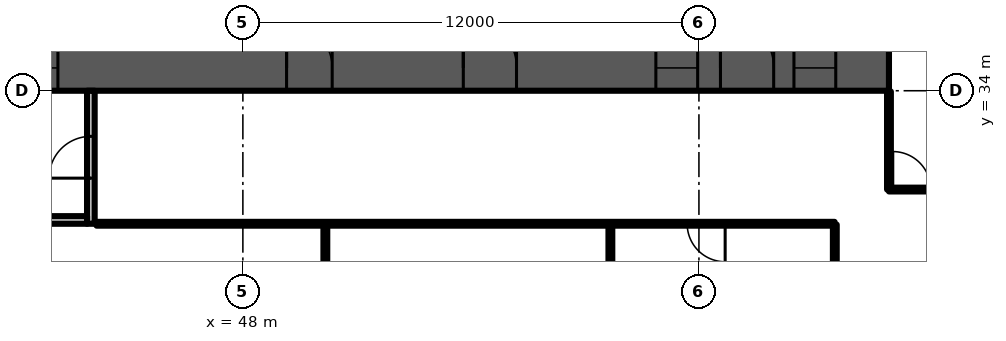
"""IFC4 building model, lengths in metres.
Left out: names, types, materials, properties, quantities, classifications, styles, units other than length and angle.
Written with IfcOpenShell. Run it as: python <this file> out.ifc"""

import sys

from ifc_helpers import new_model, si_unit, direction, frame, frame_2d, origin, place, context, subcontext, project, spatial, rectangle, extrude, element, fill, save


model = new_model("IFC4")
c1 = context("Model", 3, precision=1e-05, world=origin(), true_north=direction((0.0, 1.0)))
c2 = subcontext(c1, "Body", "Model", "MODEL_VIEW")
j1 = project(units=[si_unit("LENGTHUNIT", "METRE"), si_unit("PLANEANGLEUNIT", "RADIAN")], contexts=[c1])
p1 = place(None, origin())
s1 = spatial("IfcSite", under=j1, at=p1, CompositionType="ELEMENT")
p2 = place(p1, origin())
s2 = spatial("IfcBuilding", under=s1, at=p2, CompositionType="ELEMENT")
p3 = place(p2, frame((0.0, 0.0, 41.5)))
s3 = spatial("IfcBuildingStorey", under=s2, at=p3, CompositionType="ELEMENT", Elevation=41.5)
p4 = place(p3, frame((9.0, 34.6, 0.0), z_axis=(0.0, 0.0, 1.0), x_axis=(1.0, 0.0, 0.0)))
e1 = element("IfcWall", 1, at=p4, inside=s3, PredefinedType="SHEAR", context=c2, shape_type="SweptSolid", body=[
    extrude(rectangle(XDim=56.0, YDim=1.2, at=frame_2d((28.0, 0.0))), origin(), (0.0, 0.0, 1.0), 3.6),
])
p5 = place(p4, frame((3.3, 0.0, 0.0)))
e2 = element("IfcOpeningElement", 2, at=p5, cuts=e1, PredefinedType="OPENING", context=c2, shape_type="SweptSolid", body=[
    extrude(rectangle(XDim=1.0, YDim=2.1, at=frame_2d((0.5, 1.05))), frame((0.0, 0.61, 0.0), z_axis=(0.0, -1.0, 0.0), x_axis=(1.0, 0.0, 0.0)), (0.0, 0.0, 1.0), 1.22),
])
p6 = place(p4, frame((7.867, 0.0, 0.0)))
e3 = element("IfcOpeningElement", 3, at=p6, cuts=e1, PredefinedType="OPENING", context=c2, shape_type="SweptSolid", body=[
    extrude(rectangle(XDim=1.1, YDim=2.1, at=frame_2d((0.55, 1.05))), frame((0.0, 0.61, 0.0), z_axis=(0.0, -1.0, 0.0), x_axis=(1.0, 0.0, 0.0)), (0.0, 0.0, 1.0), 1.22),
])
p7 = place(p4, frame((12.033, 0.0, 0.0)))
e4 = element("IfcOpeningElement", 4, at=p7, cuts=e1, PredefinedType="OPENING", context=c2, shape_type="SweptSolid", body=[
    extrude(rectangle(XDim=1.1, YDim=2.1, at=frame_2d((0.55, 1.05))), frame((0.0, 0.61, 0.0), z_axis=(0.0, -1.0, 0.0), x_axis=(1.0, 0.0, 0.0)), (0.0, 0.0, 1.0), 1.22),
])
p8 = place(p4, frame((9.8, 0.0, 0.0)))
e5 = element("IfcOpeningElement", 5, at=p8, cuts=e1, PredefinedType="OPENING", context=c2, shape_type="SweptSolid", body=[
    extrude(rectangle(XDim=1.4, YDim=2.1, at=frame_2d((0.7, 1.05))), frame((0.0, 0.61, 0.0), z_axis=(0.0, -1.0, 0.0), x_axis=(1.0, 0.0, 0.0)), (0.0, 0.0, 1.0), 1.22),
])
p9 = place(p4, frame((14.65, 0.0, 0.0)))
e6 = element("IfcOpeningElement", 6, at=p9, cuts=e1, PredefinedType="OPENING", context=c2, shape_type="SweptSolid", body=[
    extrude(rectangle(XDim=1.2, YDim=2.1, at=frame_2d((0.6, 1.05))), frame((0.0, 0.61, 0.0), z_axis=(0.0, -1.0, 0.0), x_axis=(1.0, 0.0, 0.0)), (0.0, 0.0, 1.0), 1.22),
])
p10 = place(p4, frame((21.867, 0.0, 0.0)))
e7 = element("IfcOpeningElement", 7, at=p10, cuts=e1, PredefinedType="OPENING", context=c2, shape_type="SweptSolid", body=[
    extrude(rectangle(XDim=1.1, YDim=2.1, at=frame_2d((0.55, 1.05))), frame((0.0, 0.61, 0.0), z_axis=(0.0, -1.0, 0.0), x_axis=(1.0, 0.0, 0.0)), (0.0, 0.0, 1.0), 1.22),
])
p11 = place(p4, frame((26.033, 0.0, 0.0)))
e8 = element("IfcOpeningElement", 8, at=p11, cuts=e1, PredefinedType="OPENING", context=c2, shape_type="SweptSolid", body=[
    extrude(rectangle(XDim=1.1, YDim=2.1, at=frame_2d((0.55, 1.05))), frame((0.0, 0.61, 0.0), z_axis=(0.0, -1.0, 0.0), x_axis=(1.0, 0.0, 0.0)), (0.0, 0.0, 1.0), 1.22),
])
p12 = place(p4, frame((23.8, 0.0, 0.0)))
e9 = element("IfcOpeningElement", 9, at=p12, cuts=e1, PredefinedType="OPENING", context=c2, shape_type="SweptSolid", body=[
    extrude(rectangle(XDim=1.4, YDim=2.1, at=frame_2d((0.7, 1.05))), frame((0.0, 0.61, 0.0), z_axis=(0.0, -1.0, 0.0), x_axis=(1.0, 0.0, 0.0)), (0.0, 0.0, 1.0), 1.22),
])
p13 = place(p4, frame((28.867, 0.0, 0.0)))
e10 = element("IfcOpeningElement", 10, at=p13, cuts=e1, PredefinedType="OPENING", context=c2, shape_type="SweptSolid", body=[
    extrude(rectangle(XDim=1.1, YDim=2.1, at=frame_2d((0.55, 1.05))), frame((0.0, 0.61, 0.0), z_axis=(0.0, -1.0, 0.0), x_axis=(1.0, 0.0, 0.0)), (0.0, 0.0, 1.0), 1.22),
])
p14 = place(p4, frame((33.033, 0.0, 0.0)))
e11 = element("IfcOpeningElement", 11, at=p14, cuts=e1, PredefinedType="OPENING", context=c2, shape_type="SweptSolid", body=[
    extrude(rectangle(XDim=1.1, YDim=2.1, at=frame_2d((0.55, 1.05))), frame((0.0, 0.61, 0.0), z_axis=(0.0, -1.0, 0.0), x_axis=(1.0, 0.0, 0.0)), (0.0, 0.0, 1.0), 1.22),
])
p15 = place(p4, frame((40.15, 0.0, 0.0)))
e12 = element("IfcOpeningElement", 12, at=p15, cuts=e1, PredefinedType="OPENING", context=c2, shape_type="SweptSolid", body=[
    extrude(rectangle(XDim=1.2, YDim=2.1, at=frame_2d((0.6, 1.05))), frame((0.0, 0.61, 0.0), z_axis=(0.0, -1.0, 0.0), x_axis=(1.0, 0.0, 0.0)), (0.0, 0.0, 1.0), 1.22),
])
p16 = place(p4, frame((44.8, 0.0, 0.0)))
e13 = element("IfcOpeningElement", 13, at=p16, cuts=e1, PredefinedType="OPENING", context=c2, shape_type="SweptSolid", body=[
    extrude(rectangle(XDim=1.4, YDim=2.1, at=frame_2d((0.7, 1.05))), frame((0.0, 0.61, 0.0), z_axis=(0.0, -1.0, 0.0), x_axis=(1.0, 0.0, 0.0)), (0.0, 0.0, 1.0), 1.22),
])
p17 = place(p4, frame((49.867, 0.0, 0.0)))
e14 = element("IfcOpeningElement", 14, at=p17, cuts=e1, PredefinedType="OPENING", context=c2, shape_type="SweptSolid", body=[
    extrude(rectangle(XDim=1.1, YDim=2.1, at=frame_2d((0.55, 1.05))), frame((0.0, 0.61, 0.0), z_axis=(0.0, -1.0, 0.0), x_axis=(1.0, 0.0, 0.0)), (0.0, 0.0, 1.0), 1.22),
])
p18 = place(p4, frame((53.5, 0.0, 0.0)))
e15 = element("IfcOpeningElement", 15, at=p18, cuts=e1, PredefinedType="OPENING", context=c2, shape_type="SweptSolid", body=[
    extrude(rectangle(XDim=1.1, YDim=2.1, at=frame_2d((0.55, 1.05))), frame((0.0, 0.61, 0.0), z_axis=(0.0, -1.0, 0.0), x_axis=(1.0, 0.0, 0.0)), (0.0, 0.0, 1.0), 1.22),
])
p19 = place(p4, frame((51.567, 0.0, 0.0)))
e16 = element("IfcOpeningElement", 16, at=p19, cuts=e1, PredefinedType="OPENING", context=c2, shape_type="SweptSolid", body=[
    extrude(rectangle(XDim=1.4, YDim=2.1, at=frame_2d((0.7, 1.05))), frame((0.0, 0.61, 0.0), z_axis=(0.0, -1.0, 0.0), x_axis=(1.0, 0.0, 0.0)), (0.0, 0.0, 1.0), 1.22),
])
p20 = place(p3, frame((44.0, 30.5, 0.0), z_axis=(0.0, 0.0, 1.0), x_axis=(0.0, 1.0, 0.0)))
e17 = element("IfcWall", 17, at=p20, inside=s3, PredefinedType="PARTITIONING", context=c2, shape_type="SweptSolid", body=[
    extrude(rectangle(XDim=3.5, YDim=0.2, at=frame_2d((1.75, 0.0))), origin(), (0.0, 0.0, 1.0), 3.2),
])
p21 = place(p20, frame((1.2, 0.0, 0.0)))
e18 = element("IfcOpeningElement", 18, at=p21, cuts=e17, PredefinedType="OPENING", context=c2, shape_type="SweptSolid", body=[
    extrude(rectangle(XDim=1.1, YDim=2.1, at=frame_2d((0.55, 1.05))), frame((0.0, 0.11, 0.0), z_axis=(0.0, -1.0, 0.0), x_axis=(1.0, 0.0, 0.0)), (0.0, 0.0, 1.0), 0.22),
])
p22 = place(p3, frame((41.1, 30.6, 0.0), z_axis=(0.0, 0.0, 1.0), x_axis=(1.0, 0.0, 0.0)))
e19 = element("IfcWall", 19, at=p22, inside=s3, PredefinedType="PARTITIONING", context=c2, shape_type="SweptSolid", body=[
    extrude(rectangle(XDim=2.8, YDim=0.2, at=frame_2d((1.4, 0.0))), origin(), (0.0, 0.0, 1.0), 3.2),
])
for number, where, z_axis, x_axis in (
    (20, (50.17, 14.24, 0.0), (0.0, 0.0, 1.0), (0.0, 1.0, 0.0)),
    (21, (57.67, 14.24, 0.0), (0.0, 0.0, 1.0), (0.0, 1.0, 0.0)),
):
    element("IfcWall", number, at=place(p3, frame(where, z_axis=z_axis, x_axis=x_axis)), inside=s3, PredefinedType="PARTITIONING", context=c2, shape_type="SweptSolid", body=[
        extrude(rectangle(XDim=16.26, YDim=0.1, at=frame_2d((8.13, 0.0))), origin(), (0.0, 0.0, 1.0), 3.2),
    ])
p23 = place(p3, frame((63.57, 14.245, 0.0), z_axis=(0.0, 0.0, 1.0), x_axis=(0.000331, 1.000002, 0.0)))
e22 = element("IfcWall", 22, at=p23, inside=s3, PredefinedType="PARTITIONING", context=c2, shape_type="SweptSolid", body=[
    extrude(rectangle(XDim=16.233, YDim=0.1, at=frame_2d((8.117, 0.0))), origin(), (0.0, 0.0, 1.0), 3.2),
])
p24 = place(p3, frame((65.0, 31.4, 0.0), z_axis=(0.0, 0.0, 1.0), x_axis=(0.0, 1.0, 0.0)))
e23 = element("IfcWall", 23, at=p24, inside=s3, PredefinedType="PARTITIONING", context=c2, shape_type="SweptSolid", body=[
    extrude(rectangle(XDim=2.58, YDim=0.1, at=frame_2d((1.29, 0.0))), origin(), (0.0, 0.0, 1.0), 3.2),
])
p25 = place(p3, frame((65.0, 31.4, 0.0), z_axis=(0.0, 0.0, 1.0), x_axis=(1.0, 0.0, 0.0)))
e24 = element("IfcWall", 24, at=p25, inside=s3, PredefinedType="PARTITIONING", context=c2, shape_type="SweptSolid", body=[
    extrude(rectangle(XDim=7.125, YDim=0.1, at=frame_2d((3.562, 0.0))), origin(), (0.0, 0.0, 1.0), 3.2),
])
p26 = place(p25, frame((0.1, 0.0, 0.0)))
e25 = element("IfcOpeningElement", 25, at=p26, cuts=e24, PredefinedType="OPENING", context=c2, shape_type="SweptSolid", body=[
    extrude(rectangle(XDim=1.0, YDim=2.1, at=frame_2d((0.5, 1.05))), frame((0.0, 0.06, 0.0), z_axis=(0.0, -1.0, 0.0), x_axis=(1.0, 0.0, 0.0)), (0.0, 0.0, 1.0), 0.12),
])
p27 = place(p25, frame((5.625, 0.0, 0.0)))
e26 = element("IfcOpeningElement", 26, at=p27, cuts=e24, PredefinedType="OPENING", context=c2, shape_type="SweptSolid", body=[
    extrude(rectangle(XDim=1.0, YDim=2.1, at=frame_2d((0.5, 1.05))), frame((0.0, 0.06, 0.0), z_axis=(0.0, -1.0, 0.0), x_axis=(1.0, 0.0, 0.0)), (0.0, 0.0, 1.0), 0.12),
])
p28 = place(p3, frame((44.15, 30.5, 0.0), z_axis=(0.0, 0.0, 1.0), x_axis=(1.0, 0.0, 0.0)))
e27 = element("IfcWall", 27, at=p28, inside=s3, PredefinedType="PARTITIONING", context=c2, shape_type="SweptSolid", body=[
    extrude(rectangle(XDim=19.42, YDim=0.1, at=frame_2d((9.71, 0.0))), origin(), (0.0, 0.0, 1.0), 3.2),
])
p29 = place(p28, frame((15.54, 0.0, 0.0)))
e28 = element("IfcOpeningElement", 28, at=p29, cuts=e27, PredefinedType="OPENING", context=c2, shape_type="SweptSolid", body=[
    extrude(rectangle(XDim=1.0, YDim=2.1, at=frame_2d((0.5, 1.05))), frame((0.0, 0.06, 0.0), z_axis=(0.0, -1.0, 0.0), x_axis=(1.0, 0.0, 0.0)), (0.0, 0.0, 1.0), 0.12),
])
p30 = place(p14, origin())
e29 = element("IfcDoor", 29, at=p30, inside=s3, OperationType="DOUBLE_DOOR_SLIDING", PredefinedType="DOOR", context=c2, shape_type="SweptSolid", body=[
    extrude(rectangle(XDim=1.1, YDim=2.1, at=frame_2d((0.55, 1.05))), frame((0.0, 0.025, 0.0), z_axis=(0.0, -1.0, 0.0), x_axis=(1.0, 0.0, 0.0)), (0.0, 0.0, 1.0), 0.05),
])
fill(e11, e29)
p31 = place(p15, origin())
e30 = element("IfcDoor", 30, at=p31, inside=s3, OperationType="SINGLE_SWING_LEFT", PredefinedType="DOOR", context=c2, shape_type="SweptSolid", body=[
    extrude(rectangle(XDim=1.2, YDim=2.1, at=frame_2d((0.6, 1.05))), frame((0.0, 0.025, 0.0), z_axis=(0.0, -1.0, 0.0), x_axis=(1.0, 0.0, 0.0)), (0.0, 0.0, 1.0), 0.05),
])
fill(e12, e30)
p32 = place(p16, origin())
e31 = element("IfcDoor", 31, at=p32, inside=s3, OperationType="DOUBLE_DOOR_SINGLE_SWING", PredefinedType="DOOR", context=c2, shape_type="SweptSolid", body=[
    extrude(rectangle(XDim=1.4, YDim=2.1, at=frame_2d((0.7, 1.05))), frame((0.0, 0.025, 0.0), z_axis=(0.0, -1.0, 0.0), x_axis=(1.0, 0.0, 0.0)), (0.0, 0.0, 1.0), 0.05),
])
fill(e13, e31)
p33 = place(p17, origin())
e32 = element("IfcDoor", 32, at=p33, inside=s3, OperationType="DOUBLE_DOOR_SLIDING", PredefinedType="DOOR", context=c2, shape_type="SweptSolid", body=[
    extrude(rectangle(XDim=1.1, YDim=2.1, at=frame_2d((0.55, 1.05))), frame((0.0, 0.025, 0.0), z_axis=(0.0, -1.0, 0.0), x_axis=(1.0, 0.0, 0.0)), (0.0, 0.0, 1.0), 0.05),
])
fill(e14, e32)
p34 = place(p18, origin())
e33 = element("IfcDoor", 33, at=p34, inside=s3, OperationType="DOUBLE_DOOR_SLIDING", PredefinedType="DOOR", context=c2, shape_type="SweptSolid", body=[
    extrude(rectangle(XDim=1.1, YDim=2.1, at=frame_2d((0.55, 1.05))), frame((0.0, 0.025, 0.0), z_axis=(0.0, -1.0, 0.0), x_axis=(1.0, 0.0, 0.0)), (0.0, 0.0, 1.0), 0.05),
])
fill(e15, e33)
p35 = place(p19, origin())
e34 = element("IfcDoor", 34, at=p35, inside=s3, OperationType="DOUBLE_DOOR_SINGLE_SWING", PredefinedType="DOOR", context=c2, shape_type="SweptSolid", body=[
    extrude(rectangle(XDim=1.4, YDim=2.1, at=frame_2d((0.7, 1.05))), frame((0.0, 0.025, 0.0), z_axis=(0.0, -1.0, 0.0), x_axis=(1.0, 0.0, 0.0)), (0.0, 0.0, 1.0), 0.05),
])
fill(e16, e34)
p36 = place(p21, origin())
e35 = element("IfcDoor", 35, at=p36, inside=s3, OperationType="SINGLE_SWING_LEFT", PredefinedType="DOOR", context=c2, shape_type="SweptSolid", body=[
    extrude(rectangle(XDim=1.1, YDim=2.1, at=frame_2d((0.55, 1.05))), frame((0.0, 0.025, 0.0), z_axis=(0.0, -1.0, 0.0), x_axis=(1.0, 0.0, 0.0)), (0.0, 0.0, 1.0), 0.05),
])
fill(e18, e35)
p37 = place(p29, origin())
e36 = element("IfcDoor", 36, at=p37, inside=s3, OperationType="SINGLE_SWING_RIGHT", PredefinedType="DOOR", context=c2, shape_type="SweptSolid", body=[
    extrude(rectangle(XDim=1.0, YDim=2.1, at=frame_2d((0.5, 1.05))), frame((0.0, 0.025, 0.0), z_axis=(0.0, -1.0, 0.0), x_axis=(1.0, 0.0, 0.0)), (0.0, 0.0, 1.0), 0.05),
])
fill(e28, e36)
p38 = place(p26, origin())
e37 = element("IfcDoor", 37, at=p38, inside=s3, OperationType="SINGLE_SWING_LEFT", PredefinedType="DOOR", context=c2, shape_type="SweptSolid", body=[
    extrude(rectangle(XDim=1.0, YDim=2.1, at=frame_2d((0.5, 1.05))), frame((0.0, 0.025, 0.0), z_axis=(0.0, -1.0, 0.0), x_axis=(1.0, 0.0, 0.0)), (0.0, 0.0, 1.0), 0.05),
])
fill(e25, e37)
save(model, sys.argv[1])
